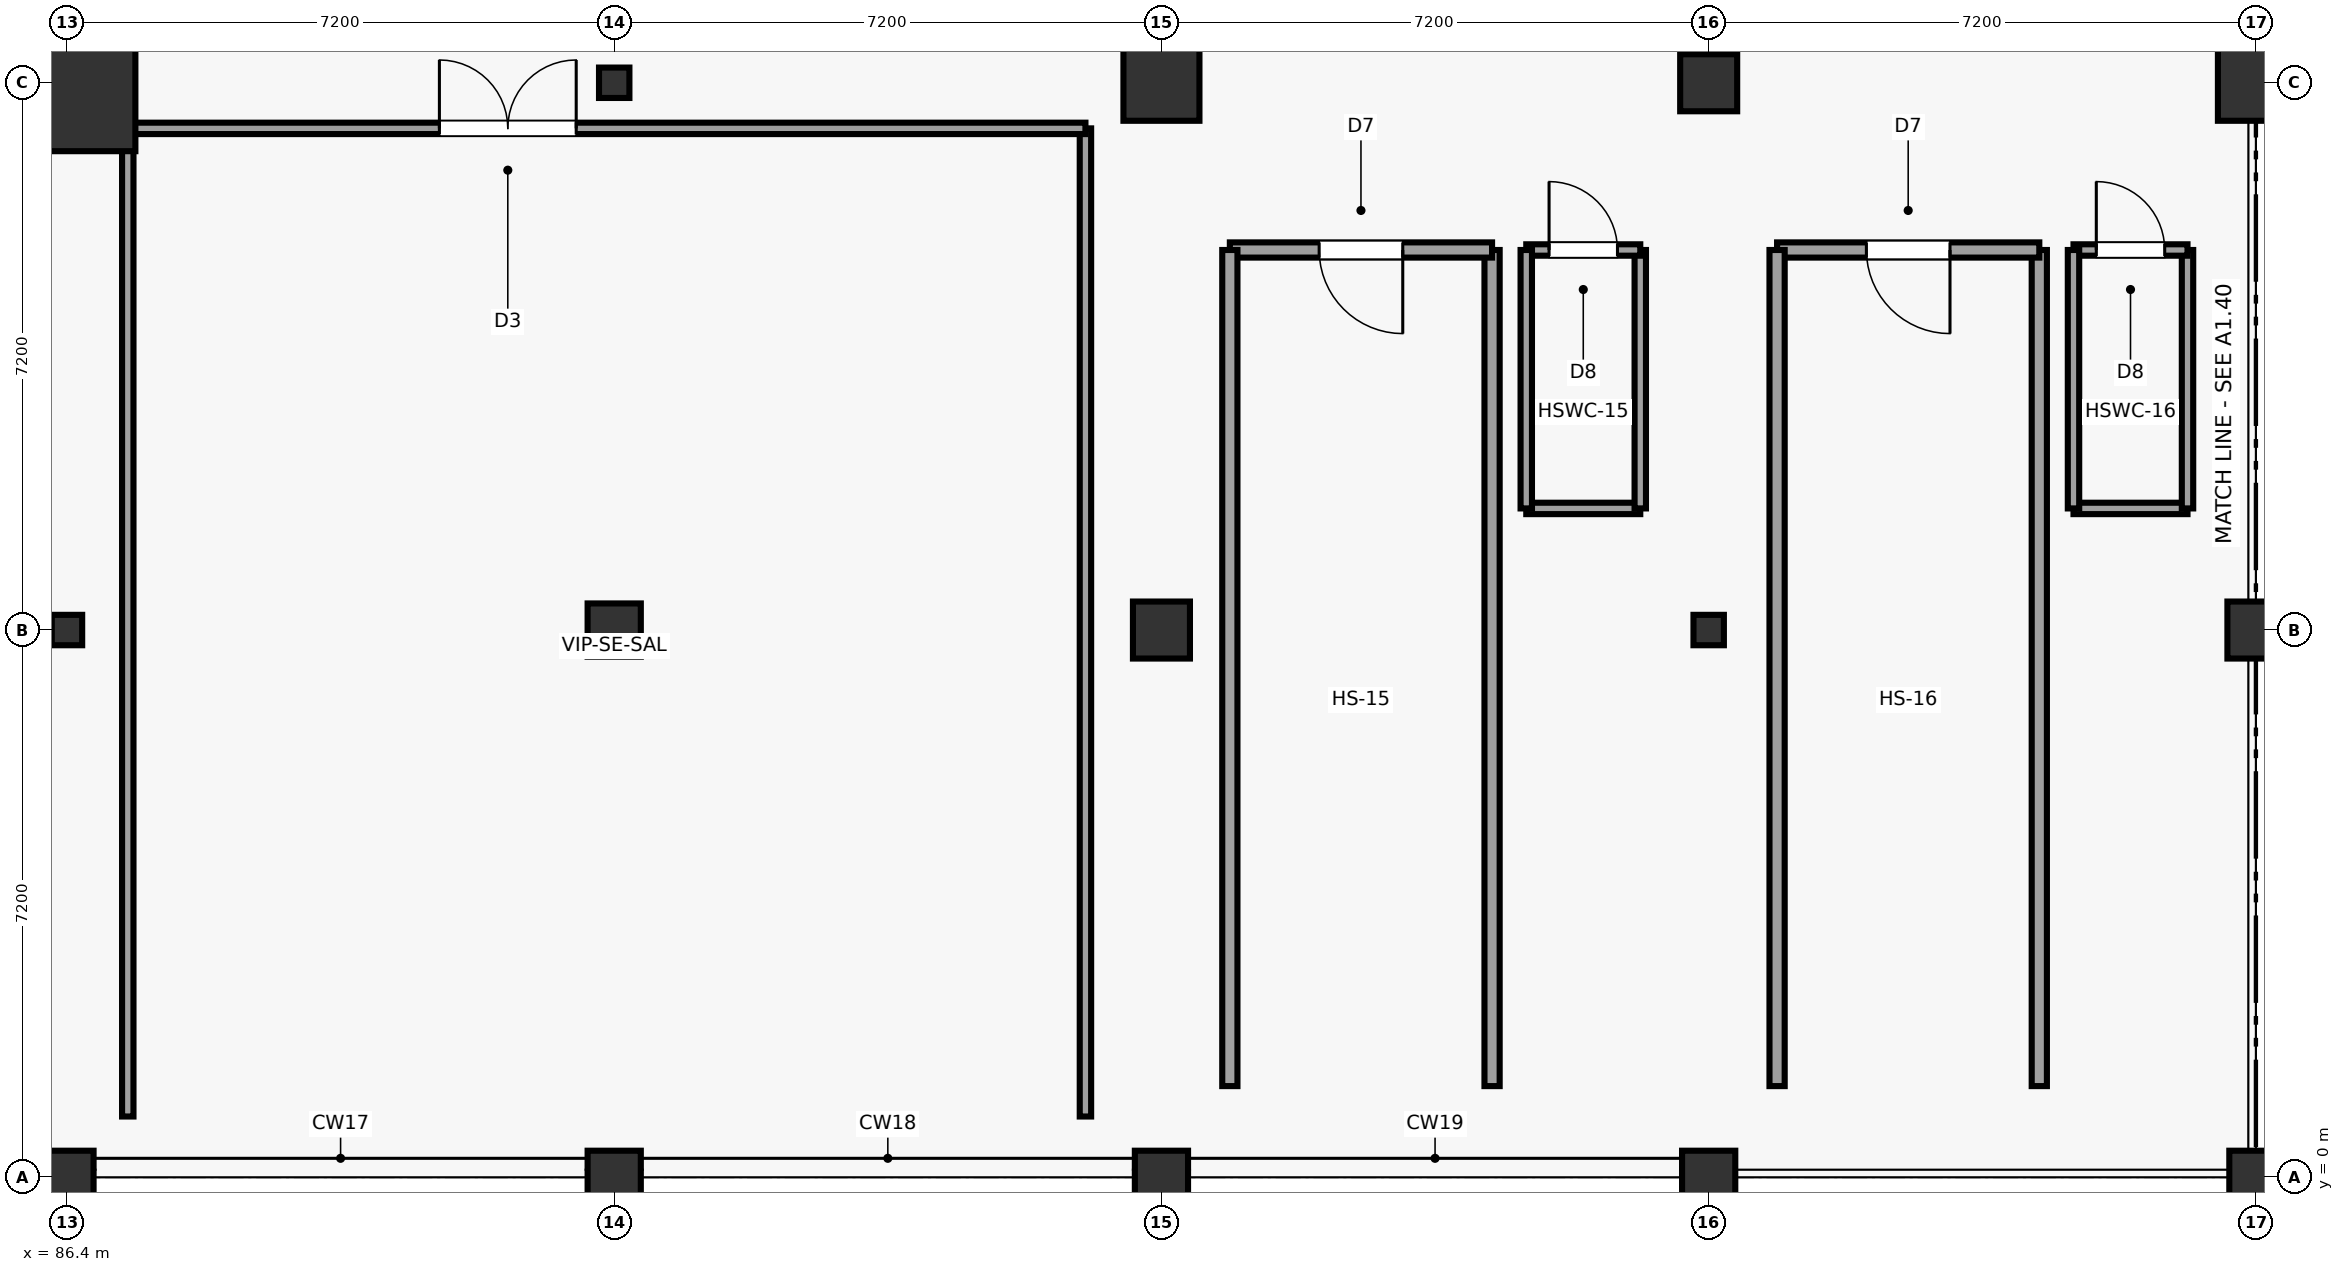
"""IFC4 building model, lengths in metres.
Left out: names, types, materials, properties, quantities, classifications, styles, units other than length and angle.
Written with IfcOpenShell. Run it as: python <this file> out.ifc"""

import sys

from ifc_helpers import new_model, si_unit, direction, frame, frame_2d, origin, origin_2d, place, context, subcontext, project, spatial, rectangle, hollow_rectangle, circle, extrude, element, fill, save


model = new_model("IFC4")
c1 = context("Model", 3, precision=1e-05, world=origin(), true_north=direction((0.0, 1.0)))
c2 = subcontext(c1, "Body", "Model", "MODEL_VIEW")
j1 = project(units=[si_unit("LENGTHUNIT", "METRE"), si_unit("PLANEANGLEUNIT", "RADIAN")], contexts=[c1])
p1 = place(None, origin())
s1 = spatial("IfcSite", under=j1, at=p1, CompositionType="ELEMENT")
p2 = place(p1, origin())
s2 = spatial("IfcBuilding", under=s1, at=p2, CompositionType="ELEMENT")
p3 = place(p2, frame((0.0, 0.0, 9.6)))
s3 = spatial("IfcBuildingStorey", under=s2, at=p3, CompositionType="ELEMENT", Elevation=9.6)
p4 = place(p3, frame((86.4, 0.0, 0.0), z_axis=(0.0, 0.0, 1.0), x_axis=(1.0, 0.0, 0.0)))
e1 = element("IfcColumn", 1, at=p4, inside=s3, PredefinedType="COLUMN", context=c2, shape_type="SweptSolid", body=[
    extrude(rectangle(XDim=0.7, YDim=0.7, at=origin_2d()), origin(), (0.0, 0.0, 1.0), 4.2),
])
p5 = place(p3, frame((86.4, 7.2, 0.0), z_axis=(0.0, 0.0, 1.0), x_axis=(1.0, 0.0, 0.0)))
e2 = element("IfcColumn", 2, at=p5, inside=s3, PredefinedType="COLUMN", context=c2, shape_type="SweptSolid", body=[
    extrude(hollow_rectangle(XDim=0.4, YDim=0.4, WallThickness=0.02, at=origin_2d()), origin(), (0.0, 0.0, 1.0), 4.2),
])
p6 = place(p3, frame((86.4, 14.4, 0.0), z_axis=(0.0, 0.0, 1.0), x_axis=(1.0, 0.0, 0.0)))
e3 = element("IfcColumn", 3, at=p6, inside=s3, PredefinedType="COLUMN", context=c2, shape_type="SweptSolid", body=[
    extrude(circle(Radius=0.9, at=origin_2d()), origin(), (0.0, 0.0, 1.0), 4.2),
])
for number, where, z_axis, x_axis in (
    (4, (93.6, 0.0, 0.0), (0.0, 0.0, 1.0), (1.0, 0.0, 0.0)),
    (5, (93.6, 7.2, 0.0), (0.0, 0.0, 1.0), (1.0, 0.0, 0.0)),
):
    element("IfcColumn", number, at=place(p3, frame(where, z_axis=z_axis, x_axis=x_axis)), inside=s3, PredefinedType="COLUMN", context=c2, shape_type="SweptSolid", body=[
        extrude(rectangle(XDim=0.7, YDim=0.7, at=origin_2d()), origin(), (0.0, 0.0, 1.0), 4.2),
    ])
p7 = place(p3, frame((93.6, 14.4, 0.0), z_axis=(0.0, 0.0, 1.0), x_axis=(1.0, 0.0, 0.0)))
e6 = element("IfcColumn", 6, at=p7, inside=s3, PredefinedType="COLUMN", context=c2, shape_type="SweptSolid", body=[
    extrude(hollow_rectangle(XDim=0.4, YDim=0.4, WallThickness=0.02, at=origin_2d()), origin(), (0.0, 0.0, 1.0), 4.2),
])
p8 = place(p3, frame((100.8, 0.0, 0.0), z_axis=(0.0, 0.0, 1.0), x_axis=(1.0, 0.0, 0.0)))
e7 = element("IfcColumn", 7, at=p8, inside=s3, PredefinedType="COLUMN", context=c2, shape_type="SweptSolid", body=[
    extrude(rectangle(XDim=0.7, YDim=0.7, at=origin_2d()), origin(), (0.0, 0.0, 1.0), 4.2),
])
p9 = place(p3, frame((100.8, 7.2, 0.0), z_axis=(0.0, 0.0, 1.0), x_axis=(1.0, 0.0, 0.0)))
e8 = element("IfcColumn", 8, at=p9, inside=s3, PredefinedType="COLUMN", context=c2, shape_type="SweptSolid", body=[
    extrude(rectangle(XDim=0.75, YDim=0.75, at=origin_2d()), origin(), (0.0, 0.0, 1.0), 4.2),
])
p10 = place(p3, frame((100.8, 14.4, 0.0), z_axis=(0.0, 0.0, 1.0), x_axis=(1.0, 0.0, 0.0)))
e9 = element("IfcColumn", 9, at=p10, inside=s3, PredefinedType="COLUMN", context=c2, shape_type="SweptSolid", body=[
    extrude(circle(Radius=0.5, at=origin_2d()), origin(), (0.0, 0.0, 1.0), 4.2),
])
p11 = place(p3, frame((108.0, 0.0, 0.0), z_axis=(0.0, 0.0, 1.0), x_axis=(1.0, 0.0, 0.0)))
e10 = element("IfcColumn", 10, at=p11, inside=s3, PredefinedType="COLUMN", context=c2, shape_type="SweptSolid", body=[
    extrude(rectangle(XDim=0.7, YDim=0.7, at=origin_2d()), origin(), (0.0, 0.0, 1.0), 4.2),
])
p12 = place(p3, frame((108.0, 7.2, 0.0), z_axis=(0.0, 0.0, 1.0), x_axis=(1.0, 0.0, 0.0)))
e11 = element("IfcColumn", 11, at=p12, inside=s3, PredefinedType="COLUMN", context=c2, shape_type="SweptSolid", body=[
    extrude(hollow_rectangle(XDim=0.4, YDim=0.4, WallThickness=0.02, at=origin_2d()), origin(), (0.0, 0.0, 1.0), 4.2),
])
p13 = place(p3, frame((108.0, 14.4, 0.0), z_axis=(0.0, 0.0, 1.0), x_axis=(1.0, 0.0, 0.0)))
e12 = element("IfcColumn", 12, at=p13, inside=s3, PredefinedType="COLUMN", context=c2, shape_type="SweptSolid", body=[
    extrude(rectangle(XDim=0.75, YDim=0.75, at=origin_2d()), origin(), (0.0, 0.0, 1.0), 4.2),
])
p14 = place(p3, frame((115.2, 0.0, 0.0), z_axis=(0.0, 0.0, 1.0), x_axis=(1.0, 0.0, 0.0)))
e13 = element("IfcColumn", 13, at=p14, inside=s3, PredefinedType="COLUMN", context=c2, shape_type="SweptSolid", body=[
    extrude(rectangle(XDim=0.7, YDim=0.7, at=origin_2d()), origin(), (0.0, 0.0, 1.0), 4.2),
])
p15 = place(p3, frame((115.2, 7.2, 0.0), z_axis=(0.0, 0.0, 1.0), x_axis=(1.0, 0.0, 0.0)))
e14 = element("IfcColumn", 14, at=p15, inside=s3, PredefinedType="COLUMN", context=c2, shape_type="SweptSolid", body=[
    extrude(rectangle(XDim=0.75, YDim=0.75, at=origin_2d()), origin(), (0.0, 0.0, 1.0), 4.2),
])
p16 = place(p3, frame((115.2, 14.4, 0.0), z_axis=(0.0, 0.0, 1.0), x_axis=(1.0, 0.0, 0.0)))
e15 = element("IfcColumn", 15, at=p16, inside=s3, PredefinedType="COLUMN", context=c2, shape_type="SweptSolid", body=[
    extrude(circle(Radius=0.5, at=origin_2d()), origin(), (0.0, 0.0, 1.0), 4.2),
])
p17 = place(p3, frame((99.8, 0.8, 0.0), z_axis=(0.0, 0.0, 1.0), x_axis=(0.0, 1.0, 0.0)))
e16 = element("IfcWall", 16, at=p17, inside=s3, PredefinedType="PARTITIONING", context=c2, shape_type="SweptSolid", body=[
    extrude(rectangle(XDim=13.0, YDim=0.15, at=frame_2d((6.5, 0.0))), origin(), (0.0, 0.0, 1.0), 2.94),
])
p18 = place(p3, frame((99.8, 13.8, 0.0), z_axis=(0.0, 0.0, 1.0), x_axis=(-1.0, 0.0, 0.0)))
e17 = element("IfcWall", 17, at=p18, inside=s3, PredefinedType="PARTITIONING", context=c2, shape_type="SweptSolid", body=[
    extrude(rectangle(XDim=12.6, YDim=0.15, at=frame_2d((6.3, 0.0))), origin(), (0.0, 0.0, 1.0), 2.94),
])
p19 = place(p18, frame((6.7, 0.0, 0.0)))
e18 = element("IfcOpeningElement", 18, at=p19, cuts=e17, PredefinedType="OPENING", context=c2, shape_type="SweptSolid", body=[
    extrude(rectangle(XDim=1.8, YDim=2.3, at=frame_2d((0.9, 1.15))), frame((0.0, 0.085, 0.0), z_axis=(0.0, -1.0, 0.0), x_axis=(1.0, 0.0, 0.0)), (0.0, 0.0, 1.0), 0.17),
])
p20 = place(p3, frame((87.2, 13.8, 0.0), z_axis=(0.0, 0.0, 1.0), x_axis=(0.0, -1.0, 0.0)))
e19 = element("IfcWall", 19, at=p20, inside=s3, PredefinedType="PARTITIONING", context=c2, shape_type="SweptSolid", body=[
    extrude(rectangle(XDim=13.0, YDim=0.15, at=frame_2d((6.5, 0.0))), origin(), (0.0, 0.0, 1.0), 2.94),
])
p21 = place(p3, frame((105.15, 1.2, 0.0), z_axis=(0.0, 0.0, 1.0), x_axis=(0.0, 1.0, 0.0)))
e20 = element("IfcWall", 20, at=p21, inside=s3, PredefinedType="PARTITIONING", context=c2, shape_type="SweptSolid", body=[
    extrude(rectangle(XDim=11.0, YDim=0.2, at=frame_2d((5.5, 0.0))), origin(), (0.0, 0.0, 1.0), 2.94),
])
p22 = place(p3, frame((105.15, 12.2, 0.0), z_axis=(0.0, 0.0, 1.0), x_axis=(-1.0, 0.0, 0.0)))
e21 = element("IfcWall", 21, at=p22, inside=s3, PredefinedType="PARTITIONING", context=c2, shape_type="SweptSolid", body=[
    extrude(rectangle(XDim=3.45, YDim=0.2, at=frame_2d((1.725, 0.0))), origin(), (0.0, 0.0, 1.0), 2.94),
])
p23 = place(p22, frame((1.175, 0.0, 0.0)))
e22 = element("IfcOpeningElement", 22, at=p23, cuts=e21, PredefinedType="OPENING", context=c2, shape_type="SweptSolid", body=[
    extrude(rectangle(XDim=1.1, YDim=2.25, at=frame_2d((0.55, 1.125))), frame((0.0, 0.11, 0.0), z_axis=(0.0, -1.0, 0.0), x_axis=(1.0, 0.0, 0.0)), (0.0, 0.0, 1.0), 0.22),
])
p24 = place(p3, frame((101.7, 12.2, 0.0), z_axis=(0.0, 0.0, 1.0), x_axis=(0.0, -1.0, 0.0)))
e23 = element("IfcWall", 23, at=p24, inside=s3, PredefinedType="PARTITIONING", context=c2, shape_type="SweptSolid", body=[
    extrude(rectangle(XDim=11.0, YDim=0.2, at=frame_2d((5.5, 0.0))), origin(), (0.0, 0.0, 1.0), 2.94),
])
p25 = place(p3, frame((105.6, 8.8, 0.0), z_axis=(0.0, 0.0, 1.0), x_axis=(1.0, 0.0, 0.0)))
e24 = element("IfcWall", 24, at=p25, inside=s3, PredefinedType="PARTITIONING", context=c2, shape_type="SweptSolid", body=[
    extrude(rectangle(XDim=1.5, YDim=0.15, at=frame_2d((0.75, 0.0))), origin(), (0.0, 0.0, 1.0), 2.94),
])
p26 = place(p3, frame((107.1, 8.8, 0.0), z_axis=(0.0, 0.0, 1.0), x_axis=(0.0, 1.0, 0.0)))
e25 = element("IfcWall", 25, at=p26, inside=s3, PredefinedType="PARTITIONING", context=c2, shape_type="SweptSolid", body=[
    extrude(rectangle(XDim=3.4, YDim=0.15, at=frame_2d((1.7, 0.0))), origin(), (0.0, 0.0, 1.0), 2.94),
])
p27 = place(p3, frame((107.1, 12.2, 0.0), z_axis=(0.0, 0.0, 1.0), x_axis=(-1.0, 0.0, 0.0)))
e26 = element("IfcWall", 26, at=p27, inside=s3, PredefinedType="PARTITIONING", context=c2, shape_type="SweptSolid", body=[
    extrude(rectangle(XDim=1.5, YDim=0.15, at=frame_2d((0.75, 0.0))), origin(), (0.0, 0.0, 1.0), 2.94),
])
p28 = place(p27, frame((0.3, 0.0, 0.0)))
e27 = element("IfcOpeningElement", 27, at=p28, cuts=e26, PredefinedType="OPENING", context=c2, shape_type="SweptSolid", body=[
    extrude(rectangle(XDim=0.9, YDim=2.15, at=frame_2d((0.45, 1.075))), frame((0.0, 0.085, 0.0), z_axis=(0.0, -1.0, 0.0), x_axis=(1.0, 0.0, 0.0)), (0.0, 0.0, 1.0), 0.17),
])
p29 = place(p3, frame((105.6, 12.2, 0.0), z_axis=(0.0, 0.0, 1.0), x_axis=(0.0, -1.0, 0.0)))
e28 = element("IfcWall", 28, at=p29, inside=s3, PredefinedType="PARTITIONING", context=c2, shape_type="SweptSolid", body=[
    extrude(rectangle(XDim=3.4, YDim=0.15, at=frame_2d((1.7, 0.0))), origin(), (0.0, 0.0, 1.0), 2.94),
])
p30 = place(p3, frame((112.35, 1.2, 0.0), z_axis=(0.0, 0.0, 1.0), x_axis=(0.0, 1.0, 0.0)))
e29 = element("IfcWall", 29, at=p30, inside=s3, PredefinedType="PARTITIONING", context=c2, shape_type="SweptSolid", body=[
    extrude(rectangle(XDim=11.0, YDim=0.2, at=frame_2d((5.5, 0.0))), origin(), (0.0, 0.0, 1.0), 2.94),
])
p31 = place(p3, frame((112.35, 12.2, 0.0), z_axis=(0.0, 0.0, 1.0), x_axis=(-1.0, 0.0, 0.0)))
e30 = element("IfcWall", 30, at=p31, inside=s3, PredefinedType="PARTITIONING", context=c2, shape_type="SweptSolid", body=[
    extrude(rectangle(XDim=3.45, YDim=0.2, at=frame_2d((1.725, 0.0))), origin(), (0.0, 0.0, 1.0), 2.94),
])
p32 = place(p31, frame((1.175, 0.0, 0.0)))
e31 = element("IfcOpeningElement", 31, at=p32, cuts=e30, PredefinedType="OPENING", context=c2, shape_type="SweptSolid", body=[
    extrude(rectangle(XDim=1.1, YDim=2.25, at=frame_2d((0.55, 1.125))), frame((0.0, 0.11, 0.0), z_axis=(0.0, -1.0, 0.0), x_axis=(1.0, 0.0, 0.0)), (0.0, 0.0, 1.0), 0.22),
])
p33 = place(p3, frame((108.9, 12.2, 0.0), z_axis=(0.0, 0.0, 1.0), x_axis=(0.0, -1.0, 0.0)))
e32 = element("IfcWall", 32, at=p33, inside=s3, PredefinedType="PARTITIONING", context=c2, shape_type="SweptSolid", body=[
    extrude(rectangle(XDim=11.0, YDim=0.2, at=frame_2d((5.5, 0.0))), origin(), (0.0, 0.0, 1.0), 2.94),
])
p34 = place(p3, frame((112.8, 8.8, 0.0), z_axis=(0.0, 0.0, 1.0), x_axis=(1.0, 0.0, 0.0)))
e33 = element("IfcWall", 33, at=p34, inside=s3, PredefinedType="PARTITIONING", context=c2, shape_type="SweptSolid", body=[
    extrude(rectangle(XDim=1.5, YDim=0.15, at=frame_2d((0.75, 0.0))), origin(), (0.0, 0.0, 1.0), 2.94),
])
p35 = place(p3, frame((114.3, 8.8, 0.0), z_axis=(0.0, 0.0, 1.0), x_axis=(0.0, 1.0, 0.0)))
e34 = element("IfcWall", 34, at=p35, inside=s3, PredefinedType="PARTITIONING", context=c2, shape_type="SweptSolid", body=[
    extrude(rectangle(XDim=3.4, YDim=0.15, at=frame_2d((1.7, 0.0))), origin(), (0.0, 0.0, 1.0), 2.94),
])
p36 = place(p3, frame((114.3, 12.2, 0.0), z_axis=(0.0, 0.0, 1.0), x_axis=(-1.0, 0.0, 0.0)))
e35 = element("IfcWall", 35, at=p36, inside=s3, PredefinedType="PARTITIONING", context=c2, shape_type="SweptSolid", body=[
    extrude(rectangle(XDim=1.5, YDim=0.15, at=frame_2d((0.75, 0.0))), origin(), (0.0, 0.0, 1.0), 2.94),
])
p37 = place(p36, frame((0.3, 0.0, 0.0)))
e36 = element("IfcOpeningElement", 36, at=p37, cuts=e35, PredefinedType="OPENING", context=c2, shape_type="SweptSolid", body=[
    extrude(rectangle(XDim=0.9, YDim=2.15, at=frame_2d((0.45, 1.075))), frame((0.0, 0.085, 0.0), z_axis=(0.0, -1.0, 0.0), x_axis=(1.0, 0.0, 0.0)), (0.0, 0.0, 1.0), 0.17),
])
p38 = place(p3, frame((112.8, 12.2, 0.0), z_axis=(0.0, 0.0, 1.0), x_axis=(0.0, -1.0, 0.0)))
e37 = element("IfcWall", 37, at=p38, inside=s3, PredefinedType="PARTITIONING", context=c2, shape_type="SweptSolid", body=[
    extrude(rectangle(XDim=3.4, YDim=0.15, at=frame_2d((1.7, 0.0))), origin(), (0.0, 0.0, 1.0), 2.94),
])
p39 = place(p19, frame((1.8, 0.0, 0.0), z_axis=(0.0, 0.0, 1.0), x_axis=(-1.0, 0.0, 0.0)))
e38 = element("IfcDoor", 38, at=p39, inside=s3, OperationType="DOUBLE_DOOR_SINGLE_SWING", PredefinedType="DOOR", context=c2, shape_type="SweptSolid", body=[
    extrude(rectangle(XDim=1.8, YDim=2.3, at=frame_2d((0.9, 1.15))), frame((0.0, 0.025, 0.0), z_axis=(0.0, -1.0, 0.0), x_axis=(1.0, 0.0, 0.0)), (0.0, 0.0, 1.0), 0.05),
])
fill(e18, e38)
p40 = place(p23, origin())
e39 = element("IfcDoor", 39, at=p40, inside=s3, OperationType="SINGLE_SWING_LEFT", PredefinedType="DOOR", context=c2, shape_type="SweptSolid", body=[
    extrude(rectangle(XDim=1.1, YDim=2.25, at=frame_2d((0.55, 1.125))), frame((0.0, 0.025, 0.0), z_axis=(0.0, -1.0, 0.0), x_axis=(1.0, 0.0, 0.0)), (0.0, 0.0, 1.0), 0.05),
])
fill(e22, e39)
p41 = place(p28, frame((0.9, 0.0, 0.0), z_axis=(0.0, 0.0, 1.0), x_axis=(-1.0, 0.0, 0.0)))
e40 = element("IfcDoor", 40, at=p41, inside=s3, OperationType="SINGLE_SWING_RIGHT", PredefinedType="DOOR", context=c2, shape_type="SweptSolid", body=[
    extrude(rectangle(XDim=0.9, YDim=2.15, at=frame_2d((0.45, 1.075))), frame((0.0, 0.025, 0.0), z_axis=(0.0, -1.0, 0.0), x_axis=(1.0, 0.0, 0.0)), (0.0, 0.0, 1.0), 0.05),
])
fill(e27, e40)
p42 = place(p32, origin())
e41 = element("IfcDoor", 41, at=p42, inside=s3, OperationType="SINGLE_SWING_LEFT", PredefinedType="DOOR", context=c2, shape_type="SweptSolid", body=[
    extrude(rectangle(XDim=1.1, YDim=2.25, at=frame_2d((0.55, 1.125))), frame((0.0, 0.025, 0.0), z_axis=(0.0, -1.0, 0.0), x_axis=(1.0, 0.0, 0.0)), (0.0, 0.0, 1.0), 0.05),
])
fill(e31, e41)
p43 = place(p37, frame((0.9, 0.0, 0.0), z_axis=(0.0, 0.0, 1.0), x_axis=(-1.0, 0.0, 0.0)))
e42 = element("IfcDoor", 42, at=p43, inside=s3, OperationType="SINGLE_SWING_RIGHT", PredefinedType="DOOR", context=c2, shape_type="SweptSolid", body=[
    extrude(rectangle(XDim=0.9, YDim=2.15, at=frame_2d((0.45, 1.075))), frame((0.0, 0.025, 0.0), z_axis=(0.0, -1.0, 0.0), x_axis=(1.0, 0.0, 0.0)), (0.0, 0.0, 1.0), 0.05),
])
fill(e36, e42)
save(model, sys.argv[1])
